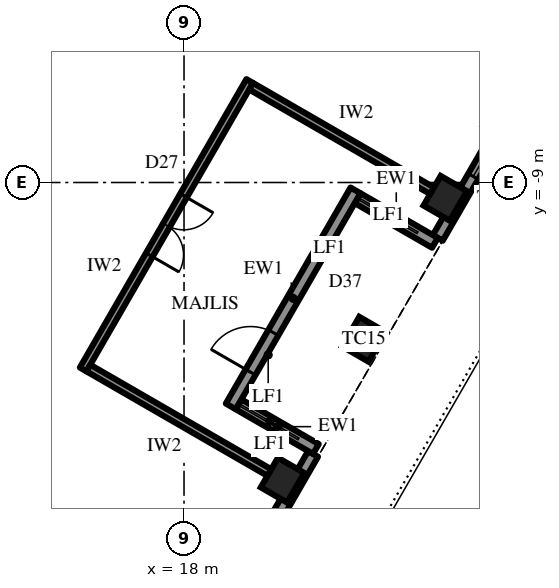
"""IFC4 building model, lengths in metres.
Left out: names, types, materials, properties, quantities, classifications, styles, units other than length and angle.
Written with IfcOpenShell. Run it as: python <this file> out.ifc"""

import sys

from ifc_helpers import new_model, si_unit, direction, frame, frame_2d, origin, origin_2d, place, context, subcontext, project, spatial, rectangle, extrude, element, fill, save


model = new_model("IFC4")
c1 = context("Model", 3, precision=1e-05, world=origin(), true_north=direction((0.0, 1.0)))
c2 = subcontext(c1, "Body", "Model", "MODEL_VIEW")
j1 = project(units=[si_unit("LENGTHUNIT", "METRE"), si_unit("PLANEANGLEUNIT", "RADIAN")], contexts=[c1])
p1 = place(None, origin())
s1 = spatial("IfcSite", under=j1, at=p1, CompositionType="ELEMENT")
p2 = place(p1, origin())
s2 = spatial("IfcBuilding", under=s1, at=p2, CompositionType="ELEMENT")
p3 = place(p2, frame((0.0, 0.0, 370.3)))
s3 = spatial("IfcBuildingStorey", under=s2, at=p3, CompositionType="ELEMENT", Elevation=370.3)
for number, where, z_axis, x_axis in (
    (1, (20.592, -16.833, 0.0), (0.0, 0.0, 1.0), (0.5, 0.866, 0.0)),
    (2, (22.733, -13.125, 0.0), (0.0, 0.0, 1.0), (0.5, 0.866, 0.0)),
    (3, (24.874, -9.417, 0.0), (0.0, 0.0, 1.0), (0.5, 0.866, 0.0)),
):
    element("IfcColumn", number, at=place(p3, frame(where, z_axis=z_axis, x_axis=x_axis)), inside=s3, PredefinedType="COLUMN", context=c2, shape_type="SweptSolid", body=[
        extrude(rectangle(XDim=0.9, YDim=0.8, at=origin_2d()), origin(), (0.0, 0.0, 1.0), 4.2),
    ])
p4 = place(p3, frame((16.613, -24.425, 0.0), z_axis=(0.0, 0.0, 1.0), x_axis=(0.499996453679, 0.866027451244, 0.0)))
e4 = element("IfcWall", 4, at=p4, inside=s3, PredefinedType="SOLIDWALL", context=c2, shape_type="SweptSolid", body=[
    extrude(rectangle(XDim=9.564, YDim=0.3, at=frame_2d((4.782, 0.0))), origin(), (0.0, 0.0, 1.0), 2.9),
])
p5 = place(p4, frame((0.866, 0.0, 0.6)))
e5 = element("IfcOpeningElement", 5, at=p5, cuts=e4, PredefinedType="OPENING", context=c2, shape_type="SweptSolid", body=[
    extrude(rectangle(XDim=2.55, YDim=2.05, at=frame_2d((1.275, 1.025))), frame((0.0, 0.16, 0.0), z_axis=(0.0, -1.0, 0.0), x_axis=(1.0, 0.0, 0.0)), (0.0, 0.0, 1.0), 0.32),
])
p6 = place(p4, frame((5.823, 0.0, 0.0)))
e6 = element("IfcOpeningElement", 6, at=p6, cuts=e4, PredefinedType="OPENING", context=c2, shape_type="SweptSolid", body=[
    extrude(rectangle(XDim=1.2, YDim=2.4, at=frame_2d((0.6, 1.2))), frame((0.0, 0.16, 0.0), z_axis=(0.0, -1.0, 0.0), x_axis=(1.0, 0.0, 0.0)), (0.0, 0.0, 1.0), 0.32),
])
p7 = place(p3, frame((24.677, -10.458, 0.0), z_axis=(0.0, 0.0, 1.0), x_axis=(0.499996453679, 0.866027451244, 0.0)))
e7 = element("IfcWall", 7, at=p7, inside=s3, PredefinedType="SOLIDWALL", context=c2, shape_type="SweptSolid", body=[
    extrude(rectangle(XDim=9.564, YDim=0.3, at=frame_2d((4.782, 0.0))), origin(), (0.0, 0.0, 1.0), 2.9),
])
p8 = place(p7, frame((1.866, 0.0, 0.6)))
e8 = element("IfcOpeningElement", 8, at=p8, cuts=e7, PredefinedType="OPENING", context=c2, shape_type="SweptSolid", body=[
    extrude(rectangle(XDim=2.55, YDim=2.05, at=frame_2d((1.275, 1.025))), frame((0.0, 0.16, 0.0), z_axis=(0.0, -1.0, 0.0), x_axis=(1.0, 0.0, 0.0)), (0.0, 0.0, 1.0), 0.32),
])
p9 = place(p7, frame((6.148, 0.0, 0.6)))
e9 = element("IfcOpeningElement", 9, at=p9, cuts=e7, PredefinedType="OPENING", context=c2, shape_type="SweptSolid", body=[
    extrude(rectangle(XDim=2.55, YDim=2.05, at=frame_2d((1.275, 1.025))), frame((0.0, 0.16, 0.0), z_axis=(0.0, -1.0, 0.0), x_axis=(1.0, 0.0, 0.0)), (0.0, 0.0, 1.0), 0.32),
])
for number, where, z_axis, x_axis in (
    (10, (21.47, -16.012, 0.0), (0.0, 0.0, 1.0), (-0.866, 0.5, 0.0)),
    (11, (24.602, -10.588, 0.0), (0.0, 0.0, 1.0), (-0.866, 0.5, 0.0)),
):
    element("IfcWall", number, at=place(p3, frame(where, z_axis=z_axis, x_axis=x_axis)), inside=s3, PredefinedType="SOLIDWALL", context=c2, shape_type="SweptSolid", body=[
        extrude(rectangle(XDim=2.35, YDim=0.3, at=frame_2d((1.175, 0.0))), origin(), (0.0, 0.0, 1.0), 2.9),
    ])
p10 = place(p3, frame((19.23, -14.892, 0.0), z_axis=(0.0, 0.0, 1.0), x_axis=(0.499999339774, 0.866025784966, 0.0)))
e12 = element("IfcWall", 12, at=p10, inside=s3, PredefinedType="SOLIDWALL", context=c2, shape_type="SweptSolid", body=[
    extrude(rectangle(XDim=6.564, YDim=0.3, at=frame_2d((3.282, 0.0))), origin(), (0.0, 0.0, 1.0), 2.9),
])
p11 = place(p10, frame((1.041, 0.0, 0.0)))
e13 = element("IfcOpeningElement", 13, at=p11, cuts=e12, PredefinedType="OPENING", context=c2, shape_type="SweptSolid", body=[
    extrude(rectangle(XDim=1.2, YDim=2.4, at=frame_2d((0.6, 1.2))), frame((0.0, 0.16, 0.0), z_axis=(0.0, -1.0, 0.0), x_axis=(1.0, 0.0, 0.0)), (0.0, 0.0, 1.0), 0.32),
])
p12 = place(p3, frame((15.346, -13.92, 0.0), z_axis=(0.0, 0.0, 1.0), x_axis=(0.500006995557, 0.86602136486, 0.0)))
e14 = element("IfcWall", 14, at=p12, inside=s3, PredefinedType="PARTITIONING", context=c2, shape_type="SweptSolid", body=[
    extrude(rectangle(XDim=8.764, YDim=0.2, at=frame_2d((4.382, 0.0))), origin(), (0.0, 0.0, 1.0), 4.0),
])
p13 = place(p12, frame((3.482, 0.0, 0.0)))
e15 = element("IfcOpeningElement", 15, at=p13, cuts=e14, PredefinedType="OPENING", context=c2, shape_type="SweptSolid", body=[
    extrude(rectangle(XDim=1.8, YDim=2.4, at=frame_2d((0.9, 1.2))), frame((0.0, 0.11, 0.0), z_axis=(0.0, -1.0, 0.0), x_axis=(1.0, 0.0, 0.0)), (0.0, 0.0, 1.0), 0.22),
])
p14 = place(p3, frame((15.483, -13.883, 0.0), z_axis=(0.0, 0.0, 1.0), x_axis=(0.866027397988, -0.499996545922, 0.0)))
e16 = element("IfcWall", 16, at=p14, inside=s3, PredefinedType="PARTITIONING", context=c2, shape_type="SweptSolid", body=[
    extrude(rectangle(XDim=5.5, YDim=0.2, at=frame_2d((2.75, 0.0))), origin(), (0.0, 0.0, 1.0), 3.082),
])
p15 = place(p3, frame((19.765, -6.467, 0.0), z_axis=(0.0, 0.0, 1.0), x_axis=(0.866027397988, -0.499996545922, 0.0)))
e17 = element("IfcWall", 17, at=p15, inside=s3, PredefinedType="PARTITIONING", context=c2, shape_type="SweptSolid", body=[
    extrude(rectangle(XDim=5.5, YDim=0.2, at=frame_2d((2.75, 0.0))), origin(), (0.0, 0.0, 1.0), 2.992),
])
p16 = place(p8, origin())
e18 = element("IfcWindow", 18, at=p16, inside=s3, PartitioningType="SINGLE_PANEL", PredefinedType="WINDOW", context=c2, shape_type="SweptSolid", body=[
    extrude(rectangle(XDim=2.55, YDim=2.05, at=frame_2d((1.275, 1.025))), frame((0.0, 0.03, 0.0), z_axis=(0.0, -1.0, 0.0), x_axis=(1.0, 0.0, 0.0)), (0.0, 0.0, 1.0), 0.06),
])
fill(e8, e18)
p17 = place(p11, origin())
e19 = element("IfcDoor", 19, at=p17, inside=s3, OperationType="SINGLE_SWING_RIGHT", PredefinedType="DOOR", context=c2, shape_type="SweptSolid", body=[
    extrude(rectangle(XDim=1.2, YDim=2.4, at=frame_2d((0.6, 1.2))), frame((0.0, 0.025, 0.0), z_axis=(0.0, -1.0, 0.0), x_axis=(1.0, 0.0, 0.0)), (0.0, 0.0, 1.0), 0.05),
])
fill(e13, e19)
p18 = place(p13, frame((1.8, 0.0, 0.0), z_axis=(0.0, 0.0, 1.0), x_axis=(-1.0, 0.0, 0.0)))
e20 = element("IfcDoor", 20, at=p18, inside=s3, OperationType="DOUBLE_DOOR_SINGLE_SWING", PredefinedType="DOOR", context=c2, shape_type="SweptSolid", body=[
    extrude(rectangle(XDim=1.8, YDim=2.4, at=frame_2d((0.9, 1.2))), frame((0.0, 0.025, 0.0), z_axis=(0.0, -1.0, 0.0), x_axis=(1.0, 0.0, 0.0)), (0.0, 0.0, 1.0), 0.05),
])
fill(e15, e20)
save(model, sys.argv[1])
